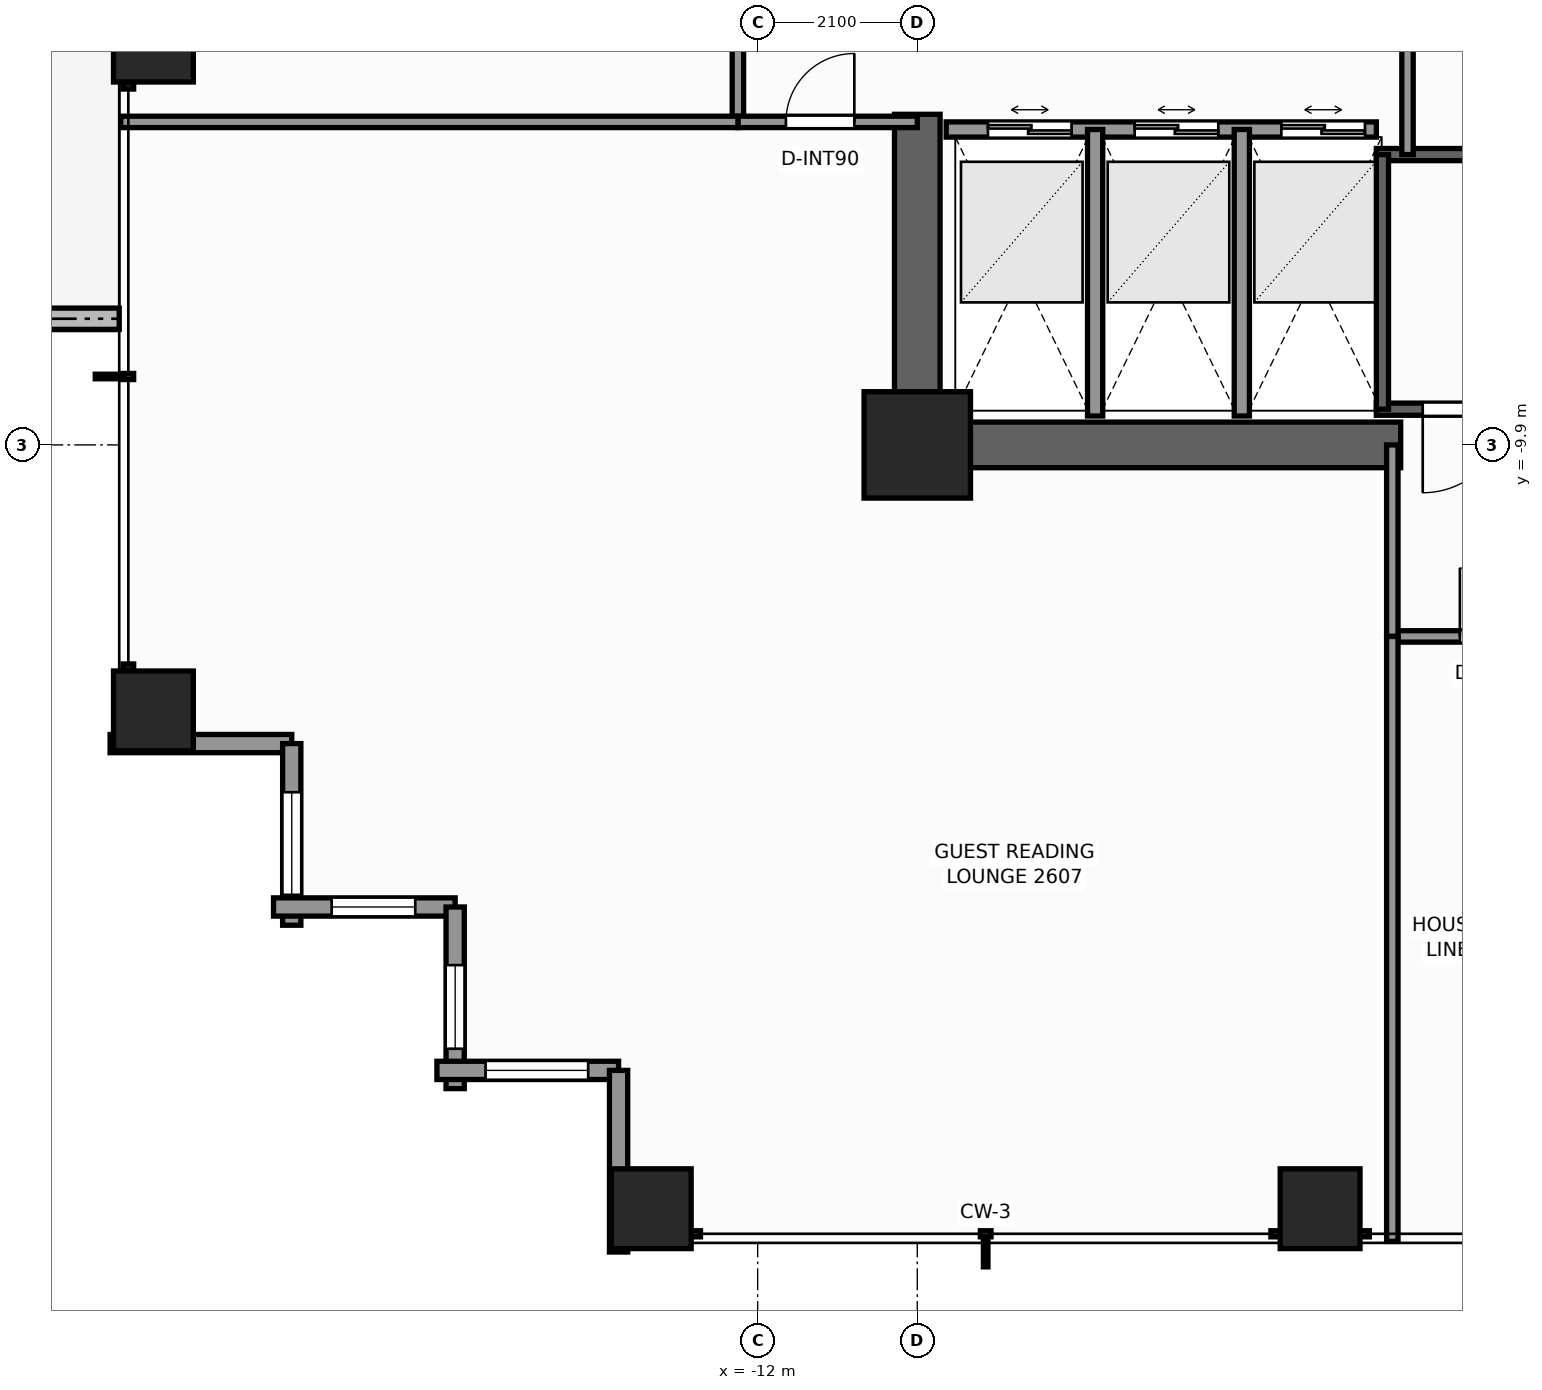
"""IFC4 building model, lengths in metres.
Left out: names, types, materials, properties, quantities, classifications, styles, units other than length and angle.
Written with IfcOpenShell. Run it as: python <this file> out.ifc"""

import sys

from ifc_helpers import new_model, si_unit, direction, frame, frame_2d, origin, origin_2d, place, context, subcontext, project, spatial, rectangle, extrude, element, fill, save


model = new_model("IFC4")
c1 = context("Model", 3, precision=1e-05, world=origin(), true_north=direction((0.0, 1.0)))
c2 = subcontext(c1, "Body", "Model", "MODEL_VIEW")
j1 = project(units=[si_unit("LENGTHUNIT", "METRE"), si_unit("PLANEANGLEUNIT", "RADIAN")], contexts=[c1])
p1 = place(None, origin())
s1 = spatial("IfcSite", under=j1, at=p1, CompositionType="ELEMENT")
p2 = place(p1, origin())
s2 = spatial("IfcBuilding", under=s1, at=p2, CompositionType="ELEMENT")
p3 = place(p2, frame((0.0, 0.0, 92.0)))
s3 = spatial("IfcBuildingStorey", under=s2, at=p3, CompositionType="ELEMENT", Elevation=92.0)
p4 = place(p3, frame((-3.54, -9.9, 0.0), z_axis=(0.0, 0.0, 1.0), x_axis=(-1.0, 0.0, 0.0)))
e1 = element("IfcWall", 1, at=p4, inside=s3, PredefinedType="SHEAR", context=c2, shape_type="SweptSolid", body=[
    extrude(rectangle(XDim=6.66, YDim=0.6, at=frame_2d((3.33, 0.0))), origin(), (0.0, 0.0, 1.0), 3.3),
])
p5 = place(p3, frame((-9.9, -9.6, 0.0), z_axis=(0.0, 0.0, 1.0), x_axis=(0.0, 1.0, 0.0)))
e2 = element("IfcWall", 2, at=p5, inside=s3, PredefinedType="SHEAR", context=c2, shape_type="SweptSolid", body=[
    extrude(rectangle(XDim=4.05, YDim=0.6, at=frame_2d((2.025, 0.0))), origin(), (0.0, 0.0, 1.0), 3.3),
])
p6 = place(p3, frame((-9.9, -9.9, 0.0), z_axis=(0.0, 0.0, 1.0), x_axis=(1.0, 0.0, 0.0)))
e3 = element("IfcColumn", 3, at=p6, inside=s3, PredefinedType="COLUMN", context=c2, shape_type="SweptSolid", body=[
    extrude(rectangle(XDim=1.4, YDim=1.4, at=origin_2d()), origin(), (0.0, 0.0, 1.0), 3.3),
])
for number, where, z_axis, x_axis in (
    (4, (-13.4, -19.95, 0.0), (0.0, 0.0, 1.0), (1.0, 0.0, 0.0)),
    (5, (-4.6, -19.95, 0.0), (0.0, 0.0, 1.0), (1.0, 0.0, 0.0)),
    (6, (-19.95, -13.4, 0.0), (0.0, 0.0, 1.0), (1.0, 0.0, 0.0)),
    (7, (-19.95, -4.6, 0.0), (0.0, 0.0, 1.0), (1.0, 0.0, 0.0)),
):
    element("IfcColumn", number, at=place(p3, frame(where, z_axis=z_axis, x_axis=x_axis)), inside=s3, PredefinedType="COLUMN", context=c2, shape_type="SweptSolid", body=[
        extrude(rectangle(XDim=1.05, YDim=1.05, at=origin_2d()), origin(), (0.0, 0.0, 1.0), 3.3),
    ])
p7 = place(p3, frame((-21.66, -8.24, -0.04), z_axis=(0.0, 0.0, 1.0), x_axis=(1.0, 0.0, 0.0)))
e8 = element("IfcWall", 8, at=p7, inside=s3, PredefinedType="PARAPET", context=c2, shape_type="SweptSolid", body=[
    extrude(rectangle(XDim=1.26, YDim=0.28, at=frame_2d((0.63, 0.0))), origin(), (0.0, 0.0, 1.0), 0.42),
])
p8 = place(p3, frame((-18.13, -13.83, 0.0), z_axis=(0.0, 0.0, 1.0), x_axis=(-1.0, 0.0, 0.0)))
e9 = element("IfcWall", 9, at=p8, inside=s3, PredefinedType="STANDARD", context=c2, shape_type="SweptSolid", body=[
    extrude(rectangle(XDim=2.39, YDim=0.24, at=frame_2d((1.195, 0.0))), origin(), (0.0, 0.0, 1.0), 2.459),
])
p9 = place(p3, frame((-18.13, -16.22, 0.0), z_axis=(0.0, 0.0, 1.0), x_axis=(0.0, 1.0, 0.0)))
e10 = element("IfcWall", 10, at=p9, inside=s3, PredefinedType="STANDARD", context=c2, shape_type="SweptSolid", body=[
    extrude(rectangle(XDim=2.39, YDim=0.24, at=frame_2d((1.195, 0.0))), origin(), (0.0, 0.0, 1.0), 2.459),
])
p10 = place(p9, frame((0.4, 0.0, 0.65)))
e11 = element("IfcOpeningElement", 11, at=p10, cuts=e10, PredefinedType="OPENING", context=c2, shape_type="SweptSolid", body=[
    extrude(rectangle(XDim=1.35, YDim=1.55, at=frame_2d((0.675, 0.775))), frame((0.0, 0.13, 0.0), z_axis=(0.0, -1.0, 0.0), x_axis=(1.0, 0.0, 0.0)), (0.0, 0.0, 1.0), 0.26),
])
p11 = place(p3, frame((-15.98, -15.98, 0.0), z_axis=(0.0, 0.0, 1.0), x_axis=(-1.0, 0.0, 0.0)))
e12 = element("IfcWall", 12, at=p11, inside=s3, PredefinedType="STANDARD", context=c2, shape_type="SweptSolid", body=[
    extrude(rectangle(XDim=2.39, YDim=0.24, at=frame_2d((1.195, 0.0))), origin(), (0.0, 0.0, 1.0), 2.459),
])
p12 = place(p11, frame((0.525, 0.0, 0.65)))
e13 = element("IfcOpeningElement", 13, at=p12, cuts=e12, PredefinedType="OPENING", context=c2, shape_type="SweptSolid", body=[
    extrude(rectangle(XDim=1.1, YDim=1.45, at=frame_2d((0.55, 0.725))), frame((0.0, 0.13, 0.0), z_axis=(0.0, -1.0, 0.0), x_axis=(1.0, 0.0, 0.0)), (0.0, 0.0, 1.0), 0.26),
])
p13 = place(p3, frame((-15.98, -18.37, 0.0), z_axis=(0.0, 0.0, 1.0), x_axis=(0.0, 1.0, 0.0)))
e14 = element("IfcWall", 14, at=p13, inside=s3, PredefinedType="STANDARD", context=c2, shape_type="SweptSolid", body=[
    extrude(rectangle(XDim=2.39, YDim=0.24, at=frame_2d((1.195, 0.0))), origin(), (0.0, 0.0, 1.0), 2.459),
])
p14 = place(p13, frame((0.525, 0.0, 0.65)))
e15 = element("IfcOpeningElement", 15, at=p14, cuts=e14, PredefinedType="OPENING", context=c2, shape_type="SweptSolid", body=[
    extrude(rectangle(XDim=1.1, YDim=1.45, at=frame_2d((0.55, 0.725))), frame((0.0, 0.13, 0.0), z_axis=(0.0, -1.0, 0.0), x_axis=(1.0, 0.0, 0.0)), (0.0, 0.0, 1.0), 0.26),
])
p15 = place(p3, frame((-13.83, -18.13, 0.0), z_axis=(0.0, 0.0, 1.0), x_axis=(-1.0, 0.0, 0.0)))
e16 = element("IfcWall", 16, at=p15, inside=s3, PredefinedType="STANDARD", context=c2, shape_type="SweptSolid", body=[
    extrude(rectangle(XDim=2.39, YDim=0.24, at=frame_2d((1.195, 0.0))), origin(), (0.0, 0.0, 1.0), 2.459),
])
p16 = place(p15, frame((0.4, 0.0, 0.65)))
e17 = element("IfcOpeningElement", 17, at=p16, cuts=e16, PredefinedType="OPENING", context=c2, shape_type="SweptSolid", body=[
    extrude(rectangle(XDim=1.35, YDim=1.55, at=frame_2d((0.675, 0.775))), frame((0.0, 0.13, 0.0), z_axis=(0.0, -1.0, 0.0), x_axis=(1.0, 0.0, 0.0)), (0.0, 0.0, 1.0), 0.26),
])
p17 = place(p3, frame((-13.83, -20.52, 0.0), z_axis=(0.0, 0.0, 1.0), x_axis=(0.0, 1.0, 0.0)))
e18 = element("IfcWall", 18, at=p17, inside=s3, PredefinedType="STANDARD", context=c2, shape_type="SweptSolid", body=[
    extrude(rectangle(XDim=2.39, YDim=0.24, at=frame_2d((1.195, 0.0))), origin(), (0.0, 0.0, 1.0), 2.459),
])
p18 = place(p3, frame((3.86, -9.43, 0.0), z_axis=(0.0, 0.0, 1.0), x_axis=(-1.0, 0.0, 0.0)))
e19 = element("IfcWall", 19, at=p18, inside=s3, PredefinedType="SHEAR", context=c2, shape_type="SweptSolid", body=[
    extrude(rectangle(XDim=7.72, YDim=0.16, at=frame_2d((3.86, 0.0))), origin(), (0.0, 0.0, 1.0), 3.3),
])
p19 = place(p18, frame((6.01, 0.0, 0.0)))
e20 = element("IfcOpeningElement", 20, at=p19, cuts=e19, PredefinedType="OPENING", context=c2, shape_type="SweptSolid", body=[
    extrude(rectangle(XDim=1.1, YDim=2.2, at=frame_2d((0.55, 1.1))), frame((0.0, 0.09, 0.0), z_axis=(0.0, -1.0, 0.0), x_axis=(1.0, 0.0, 0.0)), (0.0, 0.0, 1.0), 0.18),
])
p20 = place(p3, frame((-3.86, -6.08, 0.0), z_axis=(0.0, 0.0, 1.0), x_axis=(1.0, 0.0, 0.0)))
e21 = element("IfcWall", 21, at=p20, inside=s3, PredefinedType="SHEAR", context=c2, shape_type="SweptSolid", body=[
    extrude(rectangle(XDim=7.72, YDim=0.16, at=frame_2d((3.86, 0.0))), origin(), (0.0, 0.0, 1.0), 3.3),
])
p21 = place(p3, frame((-3.78, -9.43, 0.0), z_axis=(0.0, 0.0, 1.0), x_axis=(0.0, 1.0, 0.0)))
e22 = element("IfcWall", 22, at=p21, inside=s3, PredefinedType="SHEAR", context=c2, shape_type="SweptSolid", body=[
    extrude(rectangle(XDim=3.35, YDim=0.16, at=frame_2d((1.675, 0.0))), origin(), (0.0, 0.0, 1.0), 3.3),
])
p22 = place(p3, frame((-9.52, -5.75, 0.0), z_axis=(0.0, 0.0, 1.0), x_axis=(1.0, 0.0, 0.0)))
e23 = element("IfcWall", 23, at=p22, inside=s3, PredefinedType="SOLIDWALL", context=c2, shape_type="SweptSolid", body=[
    extrude(rectangle(XDim=5.66, YDim=0.2, at=frame_2d((2.83, 0.0))), origin(), (0.0, 0.0, 1.0), 3.08),
])
p23 = place(p22, frame((0.55, 0.0, 0.0)))
e24 = element("IfcOpeningElement", 24, at=p23, cuts=e23, PredefinedType="OPENING", context=c2, shape_type="SweptSolid", body=[
    extrude(rectangle(XDim=1.1, YDim=2.2, at=frame_2d((0.55, 1.1))), frame((0.0, 0.11, 0.0), z_axis=(0.0, -1.0, 0.0), x_axis=(1.0, 0.0, 0.0)), (0.0, 0.0, 1.0), 0.22),
])
p24 = place(p22, frame((2.48, 0.0, 0.0)))
e25 = element("IfcOpeningElement", 25, at=p24, cuts=e23, PredefinedType="OPENING", context=c2, shape_type="SweptSolid", body=[
    extrude(rectangle(XDim=1.1, YDim=2.2, at=frame_2d((0.55, 1.1))), frame((0.0, 0.11, 0.0), z_axis=(0.0, -1.0, 0.0), x_axis=(1.0, 0.0, 0.0)), (0.0, 0.0, 1.0), 0.22),
])
p25 = place(p22, frame((4.41, 0.0, 0.0)))
e26 = element("IfcOpeningElement", 26, at=p25, cuts=e23, PredefinedType="OPENING", context=c2, shape_type="SweptSolid", body=[
    extrude(rectangle(XDim=1.1, YDim=2.2, at=frame_2d((0.55, 1.1))), frame((0.0, 0.11, 0.0), z_axis=(0.0, -1.0, 0.0), x_axis=(1.0, 0.0, 0.0)), (0.0, 0.0, 1.0), 0.22),
])
for number, where, z_axis, x_axis in (
    (27, (-7.56, -9.52, 0.0), (0.0, 0.0, 1.0), (0.0, 1.0, 0.0)),
    (28, (-5.63, -9.52, 0.0), (0.0, 0.0, 1.0), (0.0, 1.0, 0.0)),
):
    element("IfcWall", number, at=place(p3, frame(where, z_axis=z_axis, x_axis=x_axis)), inside=s3, PredefinedType="SOLIDWALL", context=c2, shape_type="SweptSolid", body=[
        extrude(rectangle(XDim=3.77, YDim=0.2, at=frame_2d((1.885, 0.0))), origin(), (0.0, 0.0, 1.0), 3.08),
    ])
p26 = place(p3, frame((-3.45, -6.08, 0.0), z_axis=(0.0, 0.0, 1.0), x_axis=(0.0, 1.0, 0.0)))
e29 = element("IfcWall", 29, at=p26, inside=s3, PredefinedType="PARTITIONING", context=c2, shape_type="SweptSolid", body=[
    extrude(rectangle(XDim=2.36, YDim=0.15, at=frame_2d((1.18, 0.0))), origin(), (0.0, 0.0, 1.0), 3.08),
])
p27 = place(p3, frame((-3.65, -12.42, 0.0), z_axis=(0.0, 0.0, 1.0), x_axis=(1.0, 0.0, 0.0)))
e30 = element("IfcWall", 30, at=p27, inside=s3, PredefinedType="PARTITIONING", context=c2, shape_type="SweptSolid", body=[
    extrude(rectangle(XDim=16.07, YDim=0.15, at=frame_2d((8.035, 0.0))), origin(), (0.0, 0.0, 1.0), 2.292),
])
p28 = place(p27, frame((0.889, 0.0, 0.0)))
e31 = element("IfcOpeningElement", 31, at=p28, cuts=e30, PredefinedType="OPENING", context=c2, shape_type="SweptSolid", body=[
    extrude(rectangle(XDim=0.9, YDim=2.06, at=frame_2d((0.45, 1.03))), frame((0.0, 0.085, 0.0), z_axis=(0.0, -1.0, 0.0), x_axis=(1.0, 0.0, 0.0)), (0.0, 0.0, 1.0), 0.17),
])
p29 = place(p27, frame((4.722, 0.0, 0.0)))
e32 = element("IfcOpeningElement", 32, at=p29, cuts=e30, PredefinedType="OPENING", context=c2, shape_type="SweptSolid", body=[
    extrude(rectangle(XDim=0.95, YDim=2.06, at=frame_2d((0.475, 1.03))), frame((0.0, 0.085, 0.0), z_axis=(0.0, -1.0, 0.0), x_axis=(1.0, 0.0, 0.0)), (0.0, 0.0, 1.0), 0.17),
])
p30 = place(p27, frame((9.415, 0.0, 0.0)))
e33 = element("IfcOpeningElement", 33, at=p30, cuts=e30, PredefinedType="OPENING", context=c2, shape_type="SweptSolid", body=[
    extrude(rectangle(XDim=0.9, YDim=2.06, at=frame_2d((0.45, 1.03))), frame((0.0, 0.085, 0.0), z_axis=(0.0, -1.0, 0.0), x_axis=(1.0, 0.0, 0.0)), (0.0, 0.0, 1.0), 0.17),
])
p31 = place(p27, frame((11.313, 0.0, 0.0)))
e34 = element("IfcOpeningElement", 34, at=p31, cuts=e30, PredefinedType="OPENING", context=c2, shape_type="SweptSolid", body=[
    extrude(rectangle(XDim=0.95, YDim=2.06, at=frame_2d((0.475, 1.03))), frame((0.0, 0.085, 0.0), z_axis=(0.0, -1.0, 0.0), x_axis=(1.0, 0.0, 0.0)), (0.0, 0.0, 1.0), 0.17),
])
p32 = place(p3, frame((-3.65, -12.42, 0.0), z_axis=(0.0, 0.0, 1.0), x_axis=(0.0, 1.0, 0.0)))
e35 = element("IfcWall", 35, at=p32, inside=s3, PredefinedType="PARTITIONING", context=c2, shape_type="SweptSolid", body=[
    extrude(rectangle(XDim=2.52, YDim=0.15, at=frame_2d((1.26, 0.0))), origin(), (0.0, 0.0, 1.0), 3.08),
])
p33 = place(p3, frame((-12.26, -5.65, 0.0), z_axis=(0.0, 0.0, 1.0), x_axis=(0.0, 1.0, 0.0)))
e36 = element("IfcWall", 36, at=p33, inside=s3, PredefinedType="PARTITIONING", context=c2, shape_type="SweptSolid", body=[
    extrude(rectangle(XDim=3.6, YDim=0.15, at=frame_2d((1.8, 0.0))), origin(), (0.0, 0.0, 1.0), 2.292),
])
p34 = place(p33, frame((2.156, 0.0, 0.0)))
e37 = element("IfcOpeningElement", 37, at=p34, cuts=e36, PredefinedType="OPENING", context=c2, shape_type="SweptSolid", body=[
    extrude(rectangle(XDim=0.9, YDim=2.06, at=frame_2d((0.45, 1.03))), frame((0.0, 0.085, 0.0), z_axis=(0.0, -1.0, 0.0), x_axis=(1.0, 0.0, 0.0)), (0.0, 0.0, 1.0), 0.17),
])
p35 = place(p3, frame((-12.26, -5.65, 0.0), z_axis=(0.0, 0.0, 1.0), x_axis=(1.0, 0.0, 0.0)))
e38 = element("IfcWall", 38, at=p35, inside=s3, PredefinedType="PARTITIONING", context=c2, shape_type="SweptSolid", body=[
    extrude(rectangle(XDim=2.36, YDim=0.15, at=frame_2d((1.18, 0.0))), origin(), (0.0, 0.0, 1.0), 3.08),
])
p36 = place(p35, frame((0.632, 0.0, 0.0)))
e39 = element("IfcOpeningElement", 39, at=p36, cuts=e38, PredefinedType="OPENING", context=c2, shape_type="SweptSolid", body=[
    extrude(rectangle(XDim=0.9, YDim=2.06, at=frame_2d((0.45, 1.03))), frame((0.0, 0.085, 0.0), z_axis=(0.0, -1.0, 0.0), x_axis=(1.0, 0.0, 0.0)), (0.0, 0.0, 1.0), 0.17),
])
p37 = place(p3, frame((-20.38, -5.65, 0.0), z_axis=(0.0, 0.0, 1.0), x_axis=(1.0, 0.0, 0.0)))
e40 = element("IfcWall", 40, at=p37, inside=s3, PredefinedType="PARTITIONING", context=c2, shape_type="SweptSolid", body=[
    extrude(rectangle(XDim=8.12, YDim=0.15, at=frame_2d((4.06, 0.0))), origin(), (0.0, 0.0, 1.0), 2.449),
])
p38 = place(p3, frame((-3.65, -20.38, 0.0), z_axis=(0.0, 0.0, 1.0), x_axis=(0.0, 1.0, 0.0)))
e41 = element("IfcWall", 41, at=p38, inside=s3, PredefinedType="PARTITIONING", context=c2, shape_type="SweptSolid", body=[
    extrude(rectangle(XDim=7.96, YDim=0.15, at=frame_2d((3.98, 0.0))), origin(), (0.0, 0.0, 1.0), 2.449),
])
p39 = place(p10, origin())
e42 = element("IfcWindow", 42, at=p39, inside=s3, PartitioningType="SINGLE_PANEL", PredefinedType="WINDOW", context=c2, shape_type="SweptSolid", body=[
    extrude(rectangle(XDim=1.35, YDim=1.55, at=frame_2d((0.675, 0.775))), frame((0.0, 0.03, 0.0), z_axis=(0.0, -1.0, 0.0), x_axis=(1.0, 0.0, 0.0)), (0.0, 0.0, 1.0), 0.06),
])
fill(e11, e42)
p40 = place(p12, origin())
e43 = element("IfcWindow", 43, at=p40, inside=s3, PartitioningType="SINGLE_PANEL", PredefinedType="WINDOW", context=c2, shape_type="SweptSolid", body=[
    extrude(rectangle(XDim=1.1, YDim=1.45, at=frame_2d((0.55, 0.725))), frame((0.0, 0.03, 0.0), z_axis=(0.0, -1.0, 0.0), x_axis=(1.0, 0.0, 0.0)), (0.0, 0.0, 1.0), 0.06),
])
fill(e13, e43)
p41 = place(p14, origin())
e44 = element("IfcWindow", 44, at=p41, inside=s3, PartitioningType="SINGLE_PANEL", PredefinedType="WINDOW", context=c2, shape_type="SweptSolid", body=[
    extrude(rectangle(XDim=1.1, YDim=1.45, at=frame_2d((0.55, 0.725))), frame((0.0, 0.03, 0.0), z_axis=(0.0, -1.0, 0.0), x_axis=(1.0, 0.0, 0.0)), (0.0, 0.0, 1.0), 0.06),
])
fill(e15, e44)
p42 = place(p16, origin())
e45 = element("IfcWindow", 45, at=p42, inside=s3, PartitioningType="SINGLE_PANEL", PredefinedType="WINDOW", context=c2, shape_type="SweptSolid", body=[
    extrude(rectangle(XDim=1.35, YDim=1.55, at=frame_2d((0.675, 0.775))), frame((0.0, 0.03, 0.0), z_axis=(0.0, -1.0, 0.0), x_axis=(1.0, 0.0, 0.0)), (0.0, 0.0, 1.0), 0.06),
])
fill(e17, e45)
p43 = place(p19, origin())
e46 = element("IfcDoor", 46, at=p43, inside=s3, OperationType="SINGLE_SWING_RIGHT", PredefinedType="DOOR", context=c2, shape_type="SweptSolid", body=[
    extrude(rectangle(XDim=1.1, YDim=2.2, at=frame_2d((0.55, 1.1))), frame((0.0, 0.025, 0.0), z_axis=(0.0, -1.0, 0.0), x_axis=(1.0, 0.0, 0.0)), (0.0, 0.0, 1.0), 0.05),
])
fill(e20, e46)
p44 = place(p23, origin())
e47 = element("IfcDoor", 47, at=p44, inside=s3, OperationType="DOUBLE_DOOR_SLIDING", PredefinedType="DOOR", context=c2, shape_type="SweptSolid", body=[
    extrude(rectangle(XDim=1.1, YDim=2.2, at=frame_2d((0.55, 1.1))), frame((0.0, 0.025, 0.0), z_axis=(0.0, -1.0, 0.0), x_axis=(1.0, 0.0, 0.0)), (0.0, 0.0, 1.0), 0.05),
])
fill(e24, e47)
p45 = place(p24, origin())
e48 = element("IfcDoor", 48, at=p45, inside=s3, OperationType="DOUBLE_DOOR_SLIDING", PredefinedType="DOOR", context=c2, shape_type="SweptSolid", body=[
    extrude(rectangle(XDim=1.1, YDim=2.2, at=frame_2d((0.55, 1.1))), frame((0.0, 0.025, 0.0), z_axis=(0.0, -1.0, 0.0), x_axis=(1.0, 0.0, 0.0)), (0.0, 0.0, 1.0), 0.05),
])
fill(e25, e48)
p46 = place(p25, origin())
e49 = element("IfcDoor", 49, at=p46, inside=s3, OperationType="DOUBLE_DOOR_SLIDING", PredefinedType="DOOR", context=c2, shape_type="SweptSolid", body=[
    extrude(rectangle(XDim=1.1, YDim=2.2, at=frame_2d((0.55, 1.1))), frame((0.0, 0.025, 0.0), z_axis=(0.0, -1.0, 0.0), x_axis=(1.0, 0.0, 0.0)), (0.0, 0.0, 1.0), 0.05),
])
fill(e26, e49)
p47 = place(p36, origin())
e50 = element("IfcDoor", 50, at=p47, inside=s3, OperationType="SINGLE_SWING_RIGHT", PredefinedType="DOOR", context=c2, shape_type="SweptSolid", body=[
    extrude(rectangle(XDim=0.9, YDim=2.06, at=frame_2d((0.45, 1.03))), frame((0.0, 0.025, 0.0), z_axis=(0.0, -1.0, 0.0), x_axis=(1.0, 0.0, 0.0)), (0.0, 0.0, 1.0), 0.05),
])
fill(e39, e50)
p48 = place(p28, origin())
e51 = element("IfcDoor", 51, at=p48, inside=s3, OperationType="SINGLE_SWING_LEFT", PredefinedType="DOOR", context=c2, shape_type="SweptSolid", body=[
    extrude(rectangle(XDim=0.9, YDim=2.06, at=frame_2d((0.45, 1.03))), frame((0.0, 0.025, 0.0), z_axis=(0.0, -1.0, 0.0), x_axis=(1.0, 0.0, 0.0)), (0.0, 0.0, 1.0), 0.05),
])
fill(e31, e51)
save(model, sys.argv[1])
